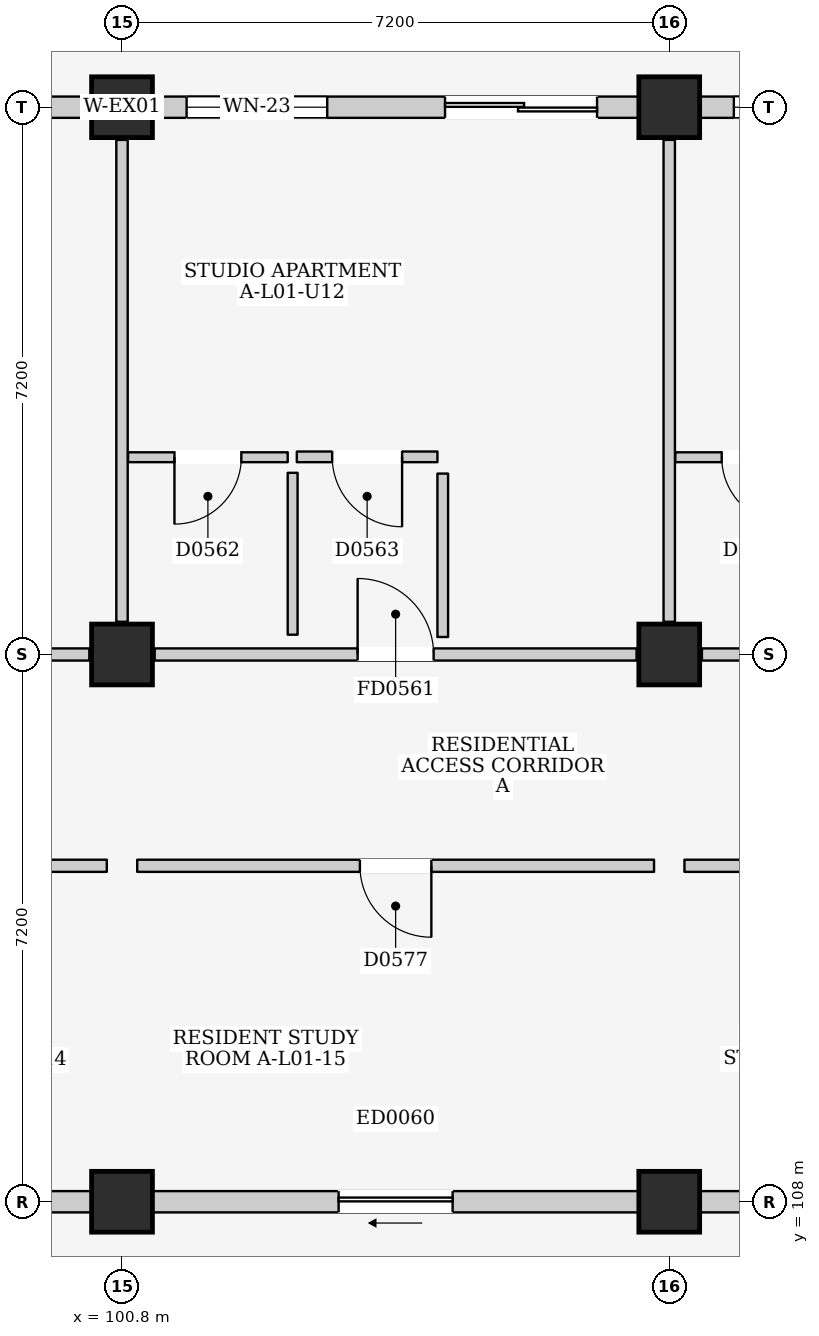
"""IFC4 building model, lengths in metres.
Left out: names, types, materials, properties, quantities, classifications, styles, units other than length and angle.
Written with IfcOpenShell. Run it as: python <this file> out.ifc"""

import sys

from ifc_helpers import new_model, si_unit, direction, frame, frame_2d, origin, origin_2d, place, context, subcontext, project, spatial, rectangle, extrude, element, fill, save


model = new_model("IFC4")
c1 = context("Model", 3, precision=1e-05, world=origin(), true_north=direction((0.0, 1.0)))
c2 = subcontext(c1, "Body", "Model", "MODEL_VIEW")
j1 = project(units=[si_unit("LENGTHUNIT", "METRE"), si_unit("PLANEANGLEUNIT", "RADIAN")], contexts=[c1])
p1 = place(None, origin())
s1 = spatial("IfcSite", under=j1, at=p1, CompositionType="ELEMENT")
p2 = place(p1, origin())
s2 = spatial("IfcBuilding", under=s1, at=p2, CompositionType="ELEMENT")
p3 = place(p2, frame((0.0, 0.0, 4.5)))
s3 = spatial("IfcBuildingStorey", under=s2, at=p3, CompositionType="ELEMENT", Elevation=4.5)
for number, where, z_axis, x_axis in (
    (1, (100.8, 108.0, 0.0), (0.0, 0.0, 1.0), (1.0, 0.0, 0.0)),
    (2, (100.8, 115.2, 0.0), (0.0, 0.0, 1.0), (1.0, 0.0, 0.0)),
    (3, (100.8, 122.4, 0.0), (0.0, 0.0, 1.0), (1.0, 0.0, 0.0)),
    (4, (108.0, 108.0, 0.0), (0.0, 0.0, 1.0), (1.0, 0.0, 0.0)),
    (5, (108.0, 115.2, 0.0), (0.0, 0.0, 1.0), (1.0, 0.0, 0.0)),
    (6, (108.0, 122.4, 0.0), (0.0, 0.0, 1.0), (1.0, 0.0, 0.0)),
):
    element("IfcColumn", number, at=place(p3, frame(where, z_axis=z_axis, x_axis=x_axis)), inside=s3, PredefinedType="COLUMN", context=c2, shape_type="SweptSolid", body=[
        extrude(rectangle(XDim=0.8, YDim=0.8, at=origin_2d()), origin(), (0.0, 0.0, 1.0), 4.5),
    ])
p4 = place(p3, frame((94.0, 122.4, 0.0), z_axis=(0.0, 0.0, 1.0), x_axis=(1.0, 0.0, 0.0)))
e7 = element("IfcWall", 7, at=p4, inside=s3, PredefinedType="ELEMENTEDWALL", context=c2, shape_type="SweptSolid", body=[
    extrude(rectangle(XDim=6.4, YDim=0.28, at=frame_2d((3.2, 0.0))), origin(), (0.0, 0.0, 1.0), 3.715),
])
p5 = place(p4, frame((3.45, 0.0, 0.0)))
e8 = element("IfcOpeningElement", 8, at=p5, cuts=e7, PredefinedType="OPENING", context=c2, shape_type="SweptSolid", body=[
    extrude(rectangle(XDim=2.4, YDim=2.12, at=frame_2d((1.2, 1.06))), frame((0.0, 0.155, 0.0), z_axis=(0.0, -1.0, 0.0), x_axis=(1.0, 0.0, 0.0)), (0.0, 0.0, 1.0), 0.31),
])
p6 = place(p4, frame((0.45, 0.0, 0.9)))
e9 = element("IfcOpeningElement", 9, at=p6, cuts=e7, PredefinedType="OPENING", context=c2, shape_type="SweptSolid", body=[
    extrude(rectangle(XDim=1.55, YDim=1.45, at=frame_2d((0.775, 0.725))), frame((0.0, 0.155, 0.0), z_axis=(0.0, -1.0, 0.0), x_axis=(1.0, 0.0, 0.0)), (0.0, 0.0, 1.0), 0.31),
])
p7 = place(p3, frame((94.0, 108.0, 0.0), z_axis=(0.0, 0.0, 1.0), x_axis=(1.0, 0.0, 0.0)))
e10 = element("IfcWall", 10, at=p7, inside=s3, PredefinedType="ELEMENTEDWALL", context=c2, shape_type="SweptSolid", body=[
    extrude(rectangle(XDim=6.4, YDim=0.28, at=frame_2d((3.2, 0.0))), origin(), (0.0, 0.0, 1.0), 3.585),
])
p8 = place(p7, frame((2.45, 0.0, 0.0)))
e11 = element("IfcOpeningElement", 11, at=p8, cuts=e10, PredefinedType="OPENING", context=c2, shape_type="SweptSolid", body=[
    extrude(rectangle(XDim=1.5, YDim=2.12, at=frame_2d((0.75, 1.06))), frame((0.0, 0.155, 0.0), z_axis=(0.0, -1.0, 0.0), x_axis=(1.0, 0.0, 0.0)), (0.0, 0.0, 1.0), 0.31),
])
p9 = place(p3, frame((101.2, 122.4, 0.0), z_axis=(0.0, 0.0, 1.0), x_axis=(1.0, 0.0, 0.0)))
e12 = element("IfcWall", 12, at=p9, inside=s3, PredefinedType="ELEMENTEDWALL", context=c2, shape_type="SweptSolid", body=[
    extrude(rectangle(XDim=6.4, YDim=0.28, at=frame_2d((3.2, 0.0))), origin(), (0.0, 0.0, 1.0), 3.715),
])
p10 = place(p9, frame((3.85, 0.0, 0.0)))
e13 = element("IfcOpeningElement", 13, at=p10, cuts=e12, PredefinedType="OPENING", context=c2, shape_type="SweptSolid", body=[
    extrude(rectangle(XDim=2.0, YDim=2.12, at=frame_2d((1.0, 1.06))), frame((0.0, 0.155, 0.0), z_axis=(0.0, -1.0, 0.0), x_axis=(1.0, 0.0, 0.0)), (0.0, 0.0, 1.0), 0.31),
])
p11 = place(p9, frame((0.45, 0.0, 0.9)))
e14 = element("IfcOpeningElement", 14, at=p11, cuts=e12, PredefinedType="OPENING", context=c2, shape_type="SweptSolid", body=[
    extrude(rectangle(XDim=1.85, YDim=1.4, at=frame_2d((0.925, 0.7))), frame((0.0, 0.155, 0.0), z_axis=(0.0, -1.0, 0.0), x_axis=(1.0, 0.0, 0.0)), (0.0, 0.0, 1.0), 0.31),
])
p12 = place(p3, frame((101.2, 108.0, 0.0), z_axis=(0.0, 0.0, 1.0), x_axis=(1.0, 0.0, 0.0)))
e15 = element("IfcWall", 15, at=p12, inside=s3, PredefinedType="ELEMENTEDWALL", context=c2, shape_type="SweptSolid", body=[
    extrude(rectangle(XDim=6.4, YDim=0.28, at=frame_2d((3.2, 0.0))), origin(), (0.0, 0.0, 1.0), 3.585),
])
p13 = place(p12, frame((2.45, 0.0, 0.0)))
e16 = element("IfcOpeningElement", 16, at=p13, cuts=e15, PredefinedType="OPENING", context=c2, shape_type="SweptSolid", body=[
    extrude(rectangle(XDim=1.5, YDim=2.12, at=frame_2d((0.75, 1.06))), frame((0.0, 0.155, 0.0), z_axis=(0.0, -1.0, 0.0), x_axis=(1.0, 0.0, 0.0)), (0.0, 0.0, 1.0), 0.31),
])
p14 = place(p3, frame((108.4, 122.4, 0.0), z_axis=(0.0, 0.0, 1.0), x_axis=(1.0, 0.0, 0.0)))
e17 = element("IfcWall", 17, at=p14, inside=s3, PredefinedType="ELEMENTEDWALL", context=c2, shape_type="SweptSolid", body=[
    extrude(rectangle(XDim=6.4, YDim=0.28, at=frame_2d((3.2, 0.0))), origin(), (0.0, 0.0, 1.0), 3.715),
])
p15 = place(p14, frame((4.45, 0.0, 0.0)))
e18 = element("IfcOpeningElement", 18, at=p15, cuts=e17, PredefinedType="OPENING", context=c2, shape_type="SweptSolid", body=[
    extrude(rectangle(XDim=1.4, YDim=2.1, at=frame_2d((0.7, 1.05))), frame((0.0, 0.155, 0.0), z_axis=(0.0, -1.0, 0.0), x_axis=(1.0, 0.0, 0.0)), (0.0, 0.0, 1.0), 0.31),
])
p16 = place(p14, frame((0.45, 0.0, 0.9)))
e19 = element("IfcOpeningElement", 19, at=p16, cuts=e17, PredefinedType="OPENING", context=c2, shape_type="SweptSolid", body=[
    extrude(rectangle(XDim=1.3, YDim=1.25, at=frame_2d((0.65, 0.625))), frame((0.0, 0.155, 0.0), z_axis=(0.0, -1.0, 0.0), x_axis=(1.0, 0.0, 0.0)), (0.0, 0.0, 1.0), 0.31),
])
p17 = place(p3, frame((108.4, 108.0, 0.0), z_axis=(0.0, 0.0, 1.0), x_axis=(1.0, 0.0, 0.0)))
e20 = element("IfcWall", 20, at=p17, inside=s3, PredefinedType="ELEMENTEDWALL", context=c2, shape_type="SweptSolid", body=[
    extrude(rectangle(XDim=6.4, YDim=0.28, at=frame_2d((3.2, 0.0))), origin(), (0.0, 0.0, 1.0), 3.585),
])
p18 = place(p17, frame((2.45, 0.0, 0.0)))
e21 = element("IfcOpeningElement", 21, at=p18, cuts=e20, PredefinedType="OPENING", context=c2, shape_type="SweptSolid", body=[
    extrude(rectangle(XDim=1.5, YDim=2.12, at=frame_2d((0.75, 1.06))), frame((0.0, 0.155, 0.0), z_axis=(0.0, -1.0, 0.0), x_axis=(1.0, 0.0, 0.0)), (0.0, 0.0, 1.0), 0.31),
])
p19 = place(p3, frame((94.03, 115.2, 0.0), z_axis=(0.0, 0.0, 1.0), x_axis=(1.0, 0.0, 0.0)))
e22 = element("IfcWall", 22, at=p19, inside=s3, PredefinedType="PARTITIONING", context=c2, shape_type="SweptSolid", body=[
    extrude(rectangle(XDim=6.34, YDim=0.16, at=frame_2d((3.17, 0.0))), origin(), (0.0, 0.0, 1.0), 3.585),
])
p20 = place(p19, frame((2.67, 0.0, 0.0)))
e23 = element("IfcOpeningElement", 23, at=p20, cuts=e22, PredefinedType="OPENING", context=c2, shape_type="SweptSolid", body=[
    extrude(rectangle(XDim=1.0, YDim=2.15, at=frame_2d((0.5, 1.075))), frame((0.0, 0.095, 0.0), z_axis=(0.0, -1.0, 0.0), x_axis=(1.0, 0.0, 0.0)), (0.0, 0.0, 1.0), 0.19),
])
p21 = place(p3, frame((100.8, 115.63, 0.0), z_axis=(0.0, 0.0, 1.0), x_axis=(0.0, 1.0, 0.0)))
e24 = element("IfcWall", 24, at=p21, inside=s3, PredefinedType="PARTITIONING", context=c2, shape_type="SweptSolid", body=[
    extrude(rectangle(XDim=6.34, YDim=0.15, at=frame_2d((3.17, 0.0))), origin(), (0.0, 0.0, 1.0), 3.685),
])
p22 = place(p3, frame((101.23, 115.2, 0.0), z_axis=(0.0, 0.0, 1.0), x_axis=(1.0, 0.0, 0.0)))
e25 = element("IfcWall", 25, at=p22, inside=s3, PredefinedType="PARTITIONING", context=c2, shape_type="SweptSolid", body=[
    extrude(rectangle(XDim=6.34, YDim=0.16, at=frame_2d((3.17, 0.0))), origin(), (0.0, 0.0, 1.0), 3.585),
])
p23 = place(p22, frame((2.67, 0.0, 0.0)))
e26 = element("IfcOpeningElement", 26, at=p23, cuts=e25, PredefinedType="OPENING", context=c2, shape_type="SweptSolid", body=[
    extrude(rectangle(XDim=1.0, YDim=2.15, at=frame_2d((0.5, 1.075))), frame((0.0, 0.095, 0.0), z_axis=(0.0, -1.0, 0.0), x_axis=(1.0, 0.0, 0.0)), (0.0, 0.0, 1.0), 0.19),
])
p24 = place(p3, frame((108.0, 115.63, 0.0), z_axis=(0.0, 0.0, 1.0), x_axis=(0.0, 1.0, 0.0)))
e27 = element("IfcWall", 27, at=p24, inside=s3, PredefinedType="PARTITIONING", context=c2, shape_type="SweptSolid", body=[
    extrude(rectangle(XDim=6.34, YDim=0.15, at=frame_2d((3.17, 0.0))), origin(), (0.0, 0.0, 1.0), 3.685),
])
p25 = place(p3, frame((100.88, 117.795, 0.0), z_axis=(0.0, 0.0, 1.0), x_axis=(1.0, 0.0, 0.0)))
e28 = element("IfcWall", 28, at=p25, inside=s3, PredefinedType="PARTITIONING", context=c2, shape_type="SweptSolid", body=[
    extrude(rectangle(XDim=2.1, YDim=0.13, at=frame_2d((1.05, 0.0))), origin(), (0.0, 0.0, 1.0), 4.25),
])
p26 = place(p25, frame((0.61, 0.0, 0.0)))
e29 = element("IfcOpeningElement", 29, at=p26, cuts=e28, PredefinedType="OPENING", context=c2, shape_type="SweptSolid", body=[
    extrude(rectangle(XDim=0.88, YDim=2.1, at=frame_2d((0.44, 1.05))), frame((0.0, 0.08, 0.0), z_axis=(0.0, -1.0, 0.0), x_axis=(1.0, 0.0, 0.0)), (0.0, 0.0, 1.0), 0.16),
])
p27 = place(p3, frame((103.045, 115.46, 0.0), z_axis=(0.0, 0.0, 1.0), x_axis=(0.0, 1.0, 0.0)))
e30 = element("IfcWall", 30, at=p27, inside=s3, PredefinedType="PARTITIONING", context=c2, shape_type="SweptSolid", body=[
    extrude(rectangle(XDim=2.13, YDim=0.13, at=frame_2d((1.065, 0.0))), origin(), (0.0, 0.0, 1.0), 4.25),
])
p28 = place(p3, frame((103.1, 117.8, 0.0), z_axis=(0.0, 0.0, 1.0), x_axis=(1.0, 0.0, 0.0)))
e31 = element("IfcWall", 31, at=p28, inside=s3, PredefinedType="PARTITIONING", context=c2, shape_type="SweptSolid", body=[
    extrude(rectangle(XDim=1.85, YDim=0.14, at=frame_2d((0.925, 0.0))), origin(), (0.0, 0.0, 1.0), 4.25),
])
p29 = place(p28, frame((0.465, 0.0, 0.0)))
e32 = element("IfcOpeningElement", 32, at=p29, cuts=e31, PredefinedType="OPENING", context=c2, shape_type="SweptSolid", body=[
    extrude(rectangle(XDim=0.92, YDim=2.1, at=frame_2d((0.46, 1.05))), frame((0.0, 0.085, 0.0), z_axis=(0.0, -1.0, 0.0), x_axis=(1.0, 0.0, 0.0)), (0.0, 0.0, 1.0), 0.17),
])
p30 = place(p3, frame((105.02, 115.43, 0.0), z_axis=(0.0, 0.0, 1.0), x_axis=(0.0, 1.0, 0.0)))
e33 = element("IfcWall", 33, at=p30, inside=s3, PredefinedType="PARTITIONING", context=c2, shape_type="SweptSolid", body=[
    extrude(rectangle(XDim=2.15, YDim=0.14, at=frame_2d((1.075, 0.0))), origin(), (0.0, 0.0, 1.0), 4.25),
])
p31 = place(p3, frame((108.43, 115.2, 0.0), z_axis=(0.0, 0.0, 1.0), x_axis=(1.0, 0.0, 0.0)))
e34 = element("IfcWall", 34, at=p31, inside=s3, PredefinedType="PARTITIONING", context=c2, shape_type="SweptSolid", body=[
    extrude(rectangle(XDim=6.34, YDim=0.16, at=frame_2d((3.17, 0.0))), origin(), (0.0, 0.0, 1.0), 3.585),
])
p32 = place(p31, frame((2.67, 0.0, 0.0)))
e35 = element("IfcOpeningElement", 35, at=p32, cuts=e34, PredefinedType="OPENING", context=c2, shape_type="SweptSolid", body=[
    extrude(rectangle(XDim=1.0, YDim=2.15, at=frame_2d((0.5, 1.075))), frame((0.0, 0.095, 0.0), z_axis=(0.0, -1.0, 0.0), x_axis=(1.0, 0.0, 0.0)), (0.0, 0.0, 1.0), 0.19),
])
p33 = place(p3, frame((108.08, 117.795, 0.0), z_axis=(0.0, 0.0, 1.0), x_axis=(1.0, 0.0, 0.0)))
e36 = element("IfcWall", 36, at=p33, inside=s3, PredefinedType="PARTITIONING", context=c2, shape_type="SweptSolid", body=[
    extrude(rectangle(XDim=2.1, YDim=0.13, at=frame_2d((1.05, 0.0))), origin(), (0.0, 0.0, 1.0), 4.25),
])
p34 = place(p33, frame((0.61, 0.0, 0.0)))
e37 = element("IfcOpeningElement", 37, at=p34, cuts=e36, PredefinedType="OPENING", context=c2, shape_type="SweptSolid", body=[
    extrude(rectangle(XDim=0.88, YDim=2.1, at=frame_2d((0.44, 1.05))), frame((0.0, 0.08, 0.0), z_axis=(0.0, -1.0, 0.0), x_axis=(1.0, 0.0, 0.0)), (0.0, 0.0, 1.0), 0.16),
])
p35 = place(p3, frame((93.8, 112.42, 0.0), z_axis=(0.0, 0.0, 1.0), x_axis=(1.0, 0.0, 0.0)))
e38 = element("IfcWall", 38, at=p35, inside=s3, PredefinedType="PARTITIONING", context=c2, shape_type="SweptSolid", body=[
    extrude(rectangle(XDim=6.8, YDim=0.16, at=frame_2d((3.4, 0.0))), origin(), (0.0, 0.0, 1.0), 4.25),
])
p36 = place(p35, frame((2.93, 0.0, 0.0)))
e39 = element("IfcOpeningElement", 39, at=p36, cuts=e38, PredefinedType="OPENING", context=c2, shape_type="SweptSolid", body=[
    extrude(rectangle(XDim=0.94, YDim=2.12, at=frame_2d((0.47, 1.06))), frame((0.0, 0.095, 0.0), z_axis=(0.0, -1.0, 0.0), x_axis=(1.0, 0.0, 0.0)), (0.0, 0.0, 1.0), 0.19),
])
p37 = place(p3, frame((101.0, 112.42, 0.0), z_axis=(0.0, 0.0, 1.0), x_axis=(1.0, 0.0, 0.0)))
e40 = element("IfcWall", 40, at=p37, inside=s3, PredefinedType="PARTITIONING", context=c2, shape_type="SweptSolid", body=[
    extrude(rectangle(XDim=6.8, YDim=0.16, at=frame_2d((3.4, 0.0))), origin(), (0.0, 0.0, 1.0), 4.25),
])
p38 = place(p37, frame((2.93, 0.0, 0.0)))
e41 = element("IfcOpeningElement", 41, at=p38, cuts=e40, PredefinedType="OPENING", context=c2, shape_type="SweptSolid", body=[
    extrude(rectangle(XDim=0.94, YDim=2.12, at=frame_2d((0.47, 1.06))), frame((0.0, 0.095, 0.0), z_axis=(0.0, -1.0, 0.0), x_axis=(1.0, 0.0, 0.0)), (0.0, 0.0, 1.0), 0.19),
])
p39 = place(p3, frame((108.2, 112.42, 0.0), z_axis=(0.0, 0.0, 1.0), x_axis=(1.0, 0.0, 0.0)))
e42 = element("IfcWall", 42, at=p39, inside=s3, PredefinedType="PARTITIONING", context=c2, shape_type="SweptSolid", body=[
    extrude(rectangle(XDim=6.72, YDim=0.16, at=frame_2d((3.36, 0.0))), origin(), (0.0, 0.0, 1.0), 4.25),
])
p40 = place(p39, frame((2.89, 0.0, 0.0)))
e43 = element("IfcOpeningElement", 43, at=p40, cuts=e42, PredefinedType="OPENING", context=c2, shape_type="SweptSolid", body=[
    extrude(rectangle(XDim=0.94, YDim=2.12, at=frame_2d((0.47, 1.06))), frame((0.0, 0.095, 0.0), z_axis=(0.0, -1.0, 0.0), x_axis=(1.0, 0.0, 0.0)), (0.0, 0.0, 1.0), 0.19),
])
p41 = place(p10, frame((2.0, 0.0, 0.0), z_axis=(0.0, 0.0, 1.0), x_axis=(-1.0, 0.0, 0.0)))
e44 = element("IfcDoor", 44, at=p41, inside=s3, OperationType="DOUBLE_DOOR_SLIDING", PredefinedType="DOOR", context=c2, shape_type="SweptSolid", body=[
    extrude(rectangle(XDim=2.0, YDim=2.12, at=frame_2d((1.0, 1.06))), frame((0.0, 0.025, 0.0), z_axis=(0.0, -1.0, 0.0), x_axis=(1.0, 0.0, 0.0)), (0.0, 0.0, 1.0), 0.05),
])
fill(e13, e44)
p42 = place(p11, origin())
e45 = element("IfcWindow", 45, at=p42, inside=s3, PartitioningType="DOUBLE_PANEL_VERTICAL", PredefinedType="WINDOW", context=c2, shape_type="SweptSolid", body=[
    extrude(rectangle(XDim=1.85, YDim=1.4, at=frame_2d((0.925, 0.7))), frame((0.0, 0.03, 0.0), z_axis=(0.0, -1.0, 0.0), x_axis=(1.0, 0.0, 0.0)), (0.0, 0.0, 1.0), 0.06),
])
fill(e14, e45)
p43 = place(p13, frame((1.5, 0.0, 0.0), z_axis=(0.0, 0.0, 1.0), x_axis=(-1.0, 0.0, 0.0)))
e46 = element("IfcDoor", 46, at=p43, inside=s3, OperationType="SLIDING_TO_LEFT", PredefinedType="DOOR", context=c2, shape_type="SweptSolid", body=[
    extrude(rectangle(XDim=1.5, YDim=2.12, at=frame_2d((0.75, 1.06))), frame((0.0, 0.025, 0.0), z_axis=(0.0, -1.0, 0.0), x_axis=(1.0, 0.0, 0.0)), (0.0, 0.0, 1.0), 0.05),
])
fill(e16, e46)
p44 = place(p16, origin())
e47 = element("IfcWindow", 47, at=p44, inside=s3, PartitioningType="SINGLE_PANEL", PredefinedType="WINDOW", context=c2, shape_type="SweptSolid", body=[
    extrude(rectangle(XDim=1.3, YDim=1.25, at=frame_2d((0.65, 0.625))), frame((0.0, 0.03, 0.0), z_axis=(0.0, -1.0, 0.0), x_axis=(1.0, 0.0, 0.0)), (0.0, 0.0, 1.0), 0.06),
])
fill(e19, e47)
p45 = place(p23, origin())
e48 = element("IfcDoor", 48, at=p45, inside=s3, OperationType="SINGLE_SWING_LEFT", PredefinedType="DOOR", context=c2, shape_type="SweptSolid", body=[
    extrude(rectangle(XDim=1.0, YDim=2.15, at=frame_2d((0.5, 1.075))), frame((0.0, 0.025, 0.0), z_axis=(0.0, -1.0, 0.0), x_axis=(1.0, 0.0, 0.0)), (0.0, 0.0, 1.0), 0.05),
])
fill(e26, e48)
p46 = place(p26, frame((0.88, 0.0, 0.0), z_axis=(0.0, 0.0, 1.0), x_axis=(-1.0, 0.0, 0.0)))
e49 = element("IfcDoor", 49, at=p46, inside=s3, OperationType="SINGLE_SWING_RIGHT", PredefinedType="DOOR", context=c2, shape_type="SweptSolid", body=[
    extrude(rectangle(XDim=0.88, YDim=2.1, at=frame_2d((0.44, 1.05))), frame((0.0, 0.025, 0.0), z_axis=(0.0, -1.0, 0.0), x_axis=(1.0, 0.0, 0.0)), (0.0, 0.0, 1.0), 0.05),
])
fill(e29, e49)
p47 = place(p29, frame((0.92, 0.0, 0.0), z_axis=(0.0, 0.0, 1.0), x_axis=(-1.0, 0.0, 0.0)))
e50 = element("IfcDoor", 50, at=p47, inside=s3, OperationType="SINGLE_SWING_LEFT", PredefinedType="DOOR", context=c2, shape_type="SweptSolid", body=[
    extrude(rectangle(XDim=0.92, YDim=2.1, at=frame_2d((0.46, 1.05))), frame((0.0, 0.025, 0.0), z_axis=(0.0, -1.0, 0.0), x_axis=(1.0, 0.0, 0.0)), (0.0, 0.0, 1.0), 0.05),
])
fill(e32, e50)
p48 = place(p34, frame((0.88, 0.0, 0.0), z_axis=(0.0, 0.0, 1.0), x_axis=(-1.0, 0.0, 0.0)))
e51 = element("IfcDoor", 51, at=p48, inside=s3, OperationType="SINGLE_SWING_LEFT", PredefinedType="DOOR", context=c2, shape_type="SweptSolid", body=[
    extrude(rectangle(XDim=0.88, YDim=2.1, at=frame_2d((0.44, 1.05))), frame((0.0, 0.025, 0.0), z_axis=(0.0, -1.0, 0.0), x_axis=(1.0, 0.0, 0.0)), (0.0, 0.0, 1.0), 0.05),
])
fill(e37, e51)
p49 = place(p38, frame((0.94, 0.0, 0.0), z_axis=(0.0, 0.0, 1.0), x_axis=(-1.0, 0.0, 0.0)))
e52 = element("IfcDoor", 52, at=p49, inside=s3, OperationType="SINGLE_SWING_LEFT", PredefinedType="DOOR", context=c2, shape_type="SweptSolid", body=[
    extrude(rectangle(XDim=0.94, YDim=2.12, at=frame_2d((0.47, 1.06))), frame((0.0, 0.025, 0.0), z_axis=(0.0, -1.0, 0.0), x_axis=(1.0, 0.0, 0.0)), (0.0, 0.0, 1.0), 0.05),
])
fill(e41, e52)
save(model, sys.argv[1])
